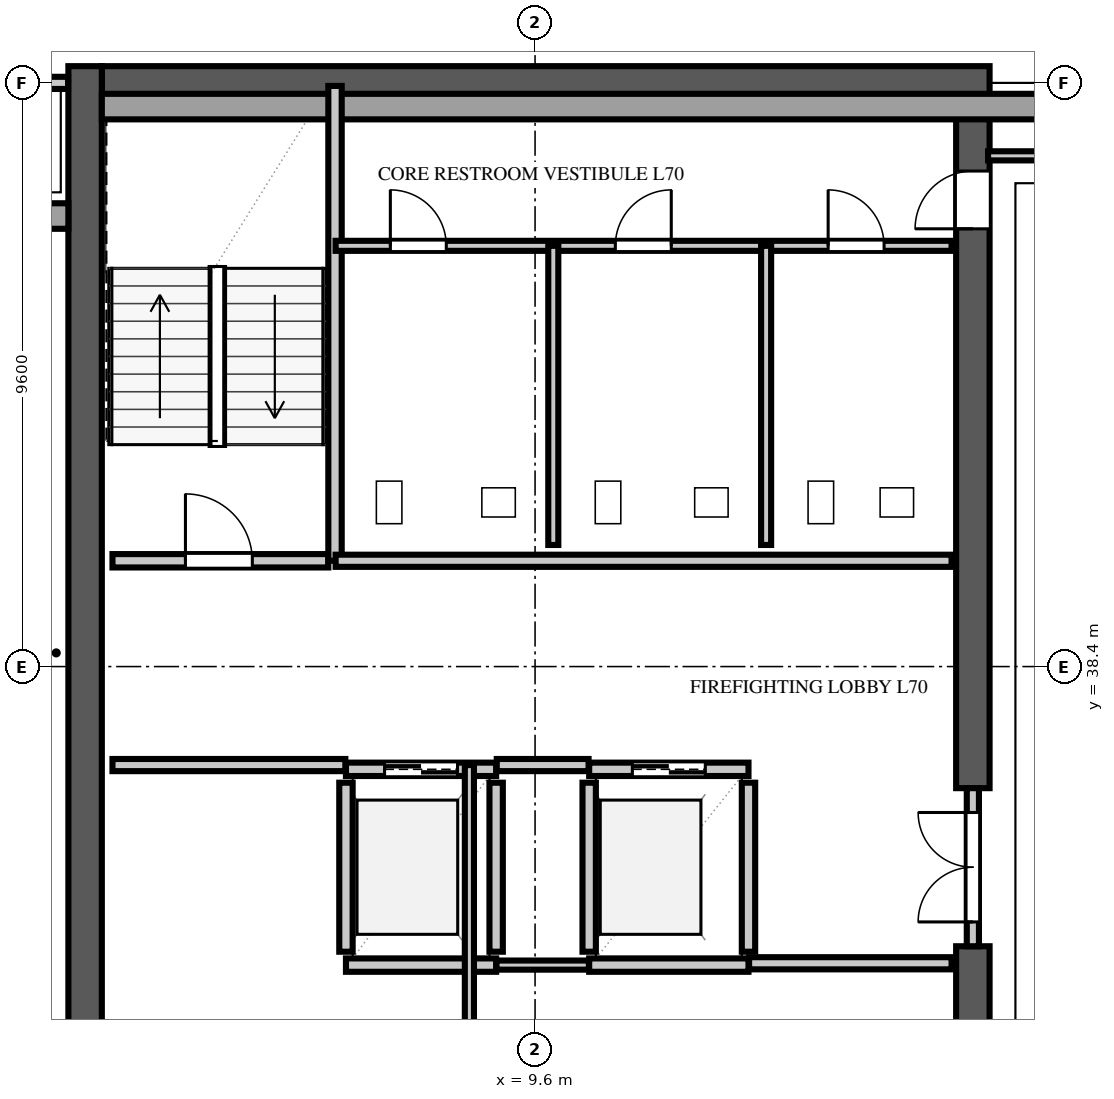
"""IFC4 building model, lengths in metres.
Left out: names, types, materials, properties, quantities, classifications, styles, units other than length and angle.
Written with IfcOpenShell. Run it as: python <this file> out.ifc"""

import sys

from ifc_helpers import new_model, si_unit, direction, frame, frame_2d, origin, place, context, subcontext, project, spatial, rectangle, extrude, element, fill, save


model = new_model("IFC4")
c1 = context("Model", 3, precision=1e-05, world=origin(), true_north=direction((0.0, 1.0)))
c2 = subcontext(c1, "Body", "Model", "MODEL_VIEW")
j1 = project(units=[si_unit("LENGTHUNIT", "METRE"), si_unit("PLANEANGLEUNIT", "RADIAN")], contexts=[c1])
p1 = place(None, origin())
s1 = spatial("IfcSite", under=j1, at=p1, CompositionType="ELEMENT")
p2 = place(p1, origin())
s2 = spatial("IfcBuilding", under=s1, at=p2, CompositionType="ELEMENT")
p3 = place(p2, frame((0.0, 0.0, 277.2)))
s3 = spatial("IfcBuildingStorey", under=s2, at=p3, CompositionType="ELEMENT", Elevation=277.2)
p4 = place(p3, frame((2.475, 48.0, 0.0), z_axis=(0.0, 0.0, 1.0), x_axis=(1.0, 0.0, 0.0)))
e1 = element("IfcWall", 1, at=p4, inside=s3, PredefinedType="SHEAR", context=c2, shape_type="SweptSolid", body=[
    extrude(rectangle(XDim=14.6, YDim=0.55, at=frame_2d((7.3, 0.0))), origin(), (0.0, 0.0, 1.0), 3.54),
])
p5 = place(p3, frame((2.2, 9.325, 0.0), z_axis=(0.0, 0.0, 1.0), x_axis=(0.0, 1.0, 0.0)))
e2 = element("IfcWall", 2, at=p5, inside=s3, PredefinedType="SHEAR", context=c2, shape_type="SweptSolid", body=[
    extrude(rectangle(XDim=38.95, YDim=0.55, at=frame_2d((19.475, 0.0))), origin(), (0.0, 0.0, 1.0), 3.54),
])
p6 = place(p3, frame((16.8, 26.0, 0.0), z_axis=(0.0, 0.0, 1.0), x_axis=(0.0, 1.0, 0.0)))
e3 = element("IfcWall", 3, at=p6, inside=s3, PredefinedType="SHEAR", context=c2, shape_type="SweptSolid", body=[
    extrude(rectangle(XDim=7.8, YDim=0.55, at=frame_2d((3.9, 0.0))), origin(), (0.0, 0.0, 1.0), 3.54),
])
p7 = place(p3, frame((16.8, 36.4, 0.0), z_axis=(0.0, 0.0, 1.0), x_axis=(0.0, 1.0, 0.0)))
e4 = element("IfcWall", 4, at=p7, inside=s3, PredefinedType="SHEAR", context=c2, shape_type="SweptSolid", body=[
    extrude(rectangle(XDim=11.325, YDim=0.55, at=frame_2d((5.663, 0.0))), origin(), (0.0, 0.0, 1.0), 3.54),
])
p8 = place(p7, frame((9.2, 0.0, 0.0)))
e5 = element("IfcOpeningElement", 5, at=p8, cuts=e4, PredefinedType="OPENING", context=c2, shape_type="SweptSolid", body=[
    extrude(rectangle(XDim=0.95, YDim=2.15, at=frame_2d((0.475, 1.075))), frame((0.0, 0.287, 0.0), z_axis=(0.0, -1.0, 0.0), x_axis=(1.0, 0.0, 0.0)), (0.0, 0.0, 1.0), 0.574),
])
p9 = place(p3, frame((36.56, 47.61, 0.0), z_axis=(0.0, 0.0, 1.0), x_axis=(-1.0, 0.0, 0.0)))
e6 = element("IfcWall", 6, at=p9, inside=s3, PredefinedType="SOLIDWALL", context=c2, shape_type="SweptSolid", body=[
    extrude(rectangle(XDim=34.085, YDim=0.42, at=frame_2d((17.042, 0.0))), origin(), (0.0, 0.0, 1.0), 3.54),
])
p10 = place(p9, frame((4.885, 0.0, 0.9)))
e7 = element("IfcOpeningElement", 7, at=p10, cuts=e6, PredefinedType="OPENING", context=c2, shape_type="SweptSolid", body=[
    extrude(rectangle(XDim=0.95, YDim=1.85, at=frame_2d((0.475, 0.925))), frame((0.0, 0.222, 0.0), z_axis=(0.0, -1.0, 0.0), x_axis=(1.0, 0.0, 0.0)), (0.0, 0.0, 1.0), 0.444),
])
p11 = place(p9, frame((9.41, 0.0, 0.9)))
e8 = element("IfcOpeningElement", 8, at=p11, cuts=e6, PredefinedType="OPENING", context=c2, shape_type="SweptSolid", body=[
    extrude(rectangle(XDim=1.5, YDim=1.85, at=frame_2d((0.75, 0.925))), frame((0.0, 0.222, 0.0), z_axis=(0.0, -1.0, 0.0), x_axis=(1.0, 0.0, 0.0)), (0.0, 0.0, 1.0), 0.444),
])
p12 = place(p9, frame((14.485, 0.0, 0.9)))
e9 = element("IfcOpeningElement", 9, at=p12, cuts=e6, PredefinedType="OPENING", context=c2, shape_type="SweptSolid", body=[
    extrude(rectangle(XDim=0.95, YDim=1.85, at=frame_2d((0.475, 0.925))), frame((0.0, 0.222, 0.0), z_axis=(0.0, -1.0, 0.0), x_axis=(1.0, 0.0, 0.0)), (0.0, 0.0, 1.0), 0.444),
])
p13 = place(p3, frame((1.925, 45.81, 0.0), z_axis=(0.0, 0.0, 1.0), x_axis=(-1.0, 0.0, 0.0)))
e10 = element("IfcWall", 10, at=p13, inside=s3, PredefinedType="SOLIDWALL", context=c2, shape_type="SweptSolid", body=[
    extrude(rectangle(XDim=1.885, YDim=0.42, at=frame_2d((0.942, 0.0))), origin(), (0.0, 0.0, 1.0), 3.54),
])
p14 = place(p3, frame((2.65, 40.14, 0.0), z_axis=(0.0, 0.0, 1.0), x_axis=(1.0, 0.0, 0.0)))
e11 = element("IfcWall", 11, at=p14, inside=s3, PredefinedType="SOLIDWALL", context=c2, shape_type="SweptSolid", body=[
    extrude(rectangle(XDim=3.55, YDim=0.22, at=frame_2d((1.775, 0.0))), origin(), (0.0, 0.0, 1.0), 3.54),
])
p15 = place(p14, frame((1.2, 0.0, 0.0)))
e12 = element("IfcOpeningElement", 12, at=p15, cuts=e11, PredefinedType="OPENING", context=c2, shape_type="SweptSolid", body=[
    extrude(rectangle(XDim=1.1, YDim=2.2, at=frame_2d((0.55, 1.1))), frame((0.0, 0.122, 0.0), z_axis=(0.0, -1.0, 0.0), x_axis=(1.0, 0.0, 0.0)), (0.0, 0.0, 1.0), 0.244),
])
p16 = place(p3, frame((6.31, 40.14, 0.0), z_axis=(0.0, 0.0, 1.0), x_axis=(0.0, 1.0, 0.0)))
e13 = element("IfcWall", 13, at=p16, inside=s3, PredefinedType="SOLIDWALL", context=c2, shape_type="SweptSolid", body=[
    extrude(rectangle(XDim=7.81, YDim=0.22, at=frame_2d((3.905, 0.0))), origin(), (0.0, 0.0, 1.0), 3.54),
])
for number, where, z_axis, x_axis in (
    (14, (6.49, 33.71, 0.0), (0.0, 0.0, 1.0), (0.0, 1.0, 0.0)),
    (15, (8.96, 33.71, 0.0), (0.0, 0.0, 1.0), (0.0, 1.0, 0.0)),
):
    element("IfcWall", number, at=place(p3, frame(where, z_axis=z_axis, x_axis=x_axis)), inside=s3, PredefinedType="SOLIDWALL", context=c2, shape_type="SweptSolid", body=[
        extrude(rectangle(XDim=2.78, YDim=0.22, at=frame_2d((1.39, 0.0))), origin(), (0.0, 0.0, 1.0), 3.54),
    ])
p17 = place(p3, frame((6.49, 33.49, 0.0), z_axis=(0.0, 0.0, 1.0), x_axis=(1.0, 0.0, 0.0)))
e16 = element("IfcWall", 16, at=p17, inside=s3, PredefinedType="SOLIDWALL", context=c2, shape_type="SweptSolid", body=[
    extrude(rectangle(XDim=2.47, YDim=0.22, at=frame_2d((1.235, 0.0))), origin(), (0.0, 0.0, 1.0), 3.54),
])
p18 = place(p3, frame((6.49, 36.71, 0.0), z_axis=(0.0, 0.0, 1.0), x_axis=(1.0, 0.0, 0.0)))
e17 = element("IfcWall", 17, at=p18, inside=s3, PredefinedType="SOLIDWALL", context=c2, shape_type="SweptSolid", body=[
    extrude(rectangle(XDim=2.47, YDim=0.22, at=frame_2d((1.235, 0.0))), origin(), (0.0, 0.0, 1.0), 3.54),
])
p19 = place(p18, frame((0.635, 0.0, 0.0)))
e18 = element("IfcOpeningElement", 18, at=p19, cuts=e17, PredefinedType="OPENING", context=c2, shape_type="SweptSolid", body=[
    extrude(rectangle(XDim=1.2, YDim=2.2, at=frame_2d((0.6, 1.1))), frame((0.0, 0.122, 0.0), z_axis=(0.0, -1.0, 0.0), x_axis=(1.0, 0.0, 0.0)), (0.0, 0.0, 1.0), 0.244),
])
for number, where, z_axis, x_axis in (
    (19, (10.49, 33.71, 0.0), (0.0, 0.0, 1.0), (0.0, 1.0, 0.0)),
    (20, (13.11, 33.71, 0.0), (0.0, 0.0, 1.0), (0.0, 1.0, 0.0)),
):
    element("IfcWall", number, at=place(p3, frame(where, z_axis=z_axis, x_axis=x_axis)), inside=s3, PredefinedType="SOLIDWALL", context=c2, shape_type="SweptSolid", body=[
        extrude(rectangle(XDim=2.78, YDim=0.22, at=frame_2d((1.39, 0.0))), origin(), (0.0, 0.0, 1.0), 3.54),
    ])
p20 = place(p3, frame((10.49, 33.49, 0.0), z_axis=(0.0, 0.0, 1.0), x_axis=(1.0, 0.0, 0.0)))
e21 = element("IfcWall", 21, at=p20, inside=s3, PredefinedType="SOLIDWALL", context=c2, shape_type="SweptSolid", body=[
    extrude(rectangle(XDim=2.62, YDim=0.22, at=frame_2d((1.31, 0.0))), origin(), (0.0, 0.0, 1.0), 3.54),
])
p21 = place(p3, frame((10.49, 36.71, 0.0), z_axis=(0.0, 0.0, 1.0), x_axis=(1.0, 0.0, 0.0)))
e22 = element("IfcWall", 22, at=p21, inside=s3, PredefinedType="SOLIDWALL", context=c2, shape_type="SweptSolid", body=[
    extrude(rectangle(XDim=2.62, YDim=0.22, at=frame_2d((1.31, 0.0))), origin(), (0.0, 0.0, 1.0), 3.54),
])
p22 = place(p21, frame((0.71, 0.0, 0.0)))
e23 = element("IfcOpeningElement", 23, at=p22, cuts=e22, PredefinedType="OPENING", context=c2, shape_type="SweptSolid", body=[
    extrude(rectangle(XDim=1.2, YDim=2.2, at=frame_2d((0.6, 1.1))), frame((0.0, 0.122, 0.0), z_axis=(0.0, -1.0, 0.0), x_axis=(1.0, 0.0, 0.0)), (0.0, 0.0, 1.0), 0.244),
])
p23 = place(p3, frame((2.65, 36.78, 0.0), z_axis=(0.0, 0.0, 1.0), x_axis=(1.0, 0.0, 0.0)))
e24 = element("IfcWall", 24, at=p23, inside=s3, PredefinedType="SOLIDWALL", context=c2, shape_type="SweptSolid", body=[
    extrude(rectangle(XDim=3.83, YDim=0.2, at=frame_2d((1.915, 0.0))), origin(), (0.0, 0.0, 1.0), 3.54),
])
p24 = place(p3, frame((8.97, 36.78, 0.0), z_axis=(0.0, 0.0, 1.0), x_axis=(1.0, 0.0, 0.0)))
e25 = element("IfcWall", 25, at=p24, inside=s3, PredefinedType="SOLIDWALL", context=c2, shape_type="SweptSolid", body=[
    extrude(rectangle(XDim=1.51, YDim=0.2, at=frame_2d((0.755, 0.0))), origin(), (0.0, 0.0, 1.0), 3.54),
])
p25 = place(p3, frame((13.12, 33.52, 0.0), z_axis=(0.0, 0.0, 1.0), x_axis=(1.0, 0.0, 0.0)))
e26 = element("IfcWall", 26, at=p25, inside=s3, PredefinedType="SOLIDWALL", context=c2, shape_type="SweptSolid", body=[
    extrude(rectangle(XDim=3.33, YDim=0.2, at=frame_2d((1.665, 0.0))), origin(), (0.0, 0.0, 1.0), 3.54),
])
p26 = place(p3, frame((6.32, 40.14, 0.0), z_axis=(0.0, 0.0, 1.0), x_axis=(1.0, 0.0, 0.0)))
e27 = element("IfcWall", 27, at=p26, inside=s3, PredefinedType="SOLIDWALL", context=c2, shape_type="SweptSolid", body=[
    extrude(rectangle(XDim=10.13, YDim=0.2, at=frame_2d((5.065, 0.0))), origin(), (0.0, 0.0, 1.0), 3.54),
])
p27 = place(p3, frame((16.8, 33.8, 0.0), z_axis=(0.0, 0.0, 1.0), x_axis=(0.0, 1.0, 0.0)))
e28 = element("IfcWall", 28, at=p27, inside=s3, PredefinedType="SOLIDWALL", context=c2, shape_type="SweptSolid", body=[
    extrude(rectangle(XDim=2.6, YDim=0.2, at=frame_2d((1.3, 0.0))), origin(), (0.0, 0.0, 1.0), 3.54),
])
p28 = place(p27, frame((0.4, 0.0, 0.0)))
e29 = element("IfcOpeningElement", 29, at=p28, cuts=e28, PredefinedType="OPENING", context=c2, shape_type="SweptSolid", body=[
    extrude(rectangle(XDim=1.8, YDim=2.2, at=frame_2d((0.9, 1.1))), frame((0.0, 0.112, 0.0), z_axis=(0.0, -1.0, 0.0), x_axis=(1.0, 0.0, 0.0)), (0.0, 0.0, 1.0), 0.224),
])
p29 = place(p3, frame((8.965, 33.49, 0.0), z_axis=(0.0, 0.0, 1.0), x_axis=(1.0, 0.0, 0.0)))
e30 = element("IfcWall", 30, at=p29, inside=s3, PredefinedType="PARTITIONING", context=c2, shape_type="SweptSolid", body=[
    extrude(rectangle(XDim=1.52, YDim=0.15, at=frame_2d((0.76, 0.0))), origin(), (0.0, 0.0, 1.0), 3.54),
])
p30 = place(p3, frame((8.52, 12.02, 0.0), z_axis=(0.0, 0.0, 1.0), x_axis=(0.0, 1.0, 0.0)))
e31 = element("IfcWall", 31, at=p30, inside=s3, PredefinedType="PARTITIONING", context=c2, shape_type="SweptSolid", body=[
    extrude(rectangle(XDim=24.76, YDim=0.15, at=frame_2d((12.38, 0.0))), origin(), (0.0, 0.0, 1.0), 3.54),
])
p31 = place(p30, frame((6.0, 0.0, 0.0)))
e32 = element("IfcOpeningElement", 32, at=p31, cuts=e31, PredefinedType="OPENING", context=c2, shape_type="SweptSolid", body=[
    extrude(rectangle(XDim=0.95, YDim=2.15, at=frame_2d((0.475, 1.075))), frame((0.0, 0.087, 0.0), z_axis=(0.0, -1.0, 0.0), x_axis=(1.0, 0.0, 0.0)), (0.0, 0.0, 1.0), 0.174),
])
p32 = place(p30, frame((14.0, 0.0, 0.0)))
e33 = element("IfcOpeningElement", 33, at=p32, cuts=e31, PredefinedType="OPENING", context=c2, shape_type="SweptSolid", body=[
    extrude(rectangle(XDim=0.95, YDim=2.15, at=frame_2d((0.475, 1.075))), frame((0.0, 0.087, 0.0), z_axis=(0.0, -1.0, 0.0), x_axis=(1.0, 0.0, 0.0)), (0.0, 0.0, 1.0), 0.174),
])
p33 = place(p3, frame((6.32, 45.32, 0.0), z_axis=(0.0, 0.0, 1.0), x_axis=(1.0, 0.0, 0.0)))
e34 = element("IfcWall", 34, at=p33, inside=s3, PredefinedType="PLUMBINGWALL", context=c2, shape_type="SweptSolid", body=[
    extrude(rectangle(XDim=10.13, YDim=0.165, at=frame_2d((5.065, 0.0))), origin(), (0.0, 0.0, 1.0), 3.54),
])
p34 = place(p33, frame((0.9, 0.0, 0.0)))
e35 = element("IfcOpeningElement", 35, at=p34, cuts=e34, PredefinedType="OPENING", context=c2, shape_type="SweptSolid", body=[
    extrude(rectangle(XDim=0.92, YDim=2.15, at=frame_2d((0.46, 1.075))), frame((0.0, 0.094, 0.0), z_axis=(0.0, -1.0, 0.0), x_axis=(1.0, 0.0, 0.0)), (0.0, 0.0, 1.0), 0.189),
])
p35 = place(p33, frame((4.6, 0.0, 0.0)))
e36 = element("IfcOpeningElement", 36, at=p35, cuts=e34, PredefinedType="OPENING", context=c2, shape_type="SweptSolid", body=[
    extrude(rectangle(XDim=0.92, YDim=2.15, at=frame_2d((0.46, 1.075))), frame((0.0, 0.094, 0.0), z_axis=(0.0, -1.0, 0.0), x_axis=(1.0, 0.0, 0.0)), (0.0, 0.0, 1.0), 0.189),
])
p36 = place(p33, frame((8.1, 0.0, 0.0)))
e37 = element("IfcOpeningElement", 37, at=p36, cuts=e34, PredefinedType="OPENING", context=c2, shape_type="SweptSolid", body=[
    extrude(rectangle(XDim=0.92, YDim=2.15, at=frame_2d((0.46, 1.075))), frame((0.0, 0.094, 0.0), z_axis=(0.0, -1.0, 0.0), x_axis=(1.0, 0.0, 0.0)), (0.0, 0.0, 1.0), 0.189),
])
for number, where, z_axis, x_axis in (
    (38, (9.9, 40.4, 0.0), (0.0, 0.0, 1.0), (0.0, 1.0, 0.0)),
    (39, (13.4, 40.4, 0.0), (0.0, 0.0, 1.0), (0.0, 1.0, 0.0)),
):
    element("IfcWall", number, at=place(p3, frame(where, z_axis=z_axis, x_axis=x_axis)), inside=s3, PredefinedType="PLUMBINGWALL", context=c2, shape_type="SweptSolid", body=[
        extrude(rectangle(XDim=4.92, YDim=0.165, at=frame_2d((2.46, 0.0))), origin(), (0.0, 0.0, 1.0), 3.54),
    ])
p37 = place(p3, frame((0.85, 48.0, 0.0), z_axis=(0.0, 0.0, 1.0), x_axis=(1.0, 0.0, 0.0)))
e40 = element("IfcWall", 40, at=p37, inside=s3, PredefinedType="SOLIDWALL", context=c2, shape_type="SweptSolid", body=[
    extrude(rectangle(XDim=1.07, YDim=0.2, at=frame_2d((0.535, 0.0))), origin(), (0.0, 0.0, 1.0), 3.54),
])
p38 = place(p3, frame((17.05, 46.8, 0.0), z_axis=(0.0, 0.0, 1.0), x_axis=(1.0, 0.0, 0.0)))
e41 = element("IfcWall", 41, at=p38, inside=s3, PredefinedType="PARTITIONING", context=c2, shape_type="SweptSolid", body=[
    extrude(rectangle(XDim=2.15, YDim=0.15, at=frame_2d((1.075, 0.0))), origin(), (0.0, 0.0, 1.0), 3.54),
])
p39 = place(p15, origin())
e42 = element("IfcDoor", 42, at=p39, inside=s3, OperationType="SINGLE_SWING_LEFT", PredefinedType="DOOR", context=c2, shape_type="SweptSolid", body=[
    extrude(rectangle(XDim=1.1, YDim=2.2, at=frame_2d((0.55, 1.1))), frame((0.0, 0.025, 0.0), z_axis=(0.0, -1.0, 0.0), x_axis=(1.0, 0.0, 0.0)), (0.0, 0.0, 1.0), 0.05),
])
fill(e12, e42)
p40 = place(p19, origin())
e43 = element("IfcDoor", 43, at=p40, inside=s3, OperationType="DOUBLE_DOOR_SLIDING", PredefinedType="DOOR", context=c2, shape_type="SweptSolid", body=[
    extrude(rectangle(XDim=1.2, YDim=2.2, at=frame_2d((0.6, 1.1))), frame((0.0, 0.025, 0.0), z_axis=(0.0, -1.0, 0.0), x_axis=(1.0, 0.0, 0.0)), (0.0, 0.0, 1.0), 0.05),
])
fill(e18, e43)
p41 = place(p22, origin())
e44 = element("IfcDoor", 44, at=p41, inside=s3, OperationType="DOUBLE_DOOR_SLIDING", PredefinedType="DOOR", context=c2, shape_type="SweptSolid", body=[
    extrude(rectangle(XDim=1.2, YDim=2.2, at=frame_2d((0.6, 1.1))), frame((0.0, 0.025, 0.0), z_axis=(0.0, -1.0, 0.0), x_axis=(1.0, 0.0, 0.0)), (0.0, 0.0, 1.0), 0.05),
])
fill(e23, e44)
p42 = place(p8, origin())
e45 = element("IfcDoor", 45, at=p42, inside=s3, OperationType="SINGLE_SWING_LEFT", PredefinedType="DOOR", context=c2, shape_type="SweptSolid", body=[
    extrude(rectangle(XDim=0.95, YDim=2.15, at=frame_2d((0.475, 1.075))), frame((0.0, 0.025, 0.0), z_axis=(0.0, -1.0, 0.0), x_axis=(1.0, 0.0, 0.0)), (0.0, 0.0, 1.0), 0.05),
])
fill(e5, e45)
p43 = place(p28, origin())
e46 = element("IfcDoor", 46, at=p43, inside=s3, OperationType="DOUBLE_DOOR_SINGLE_SWING", PredefinedType="DOOR", context=c2, shape_type="SweptSolid", body=[
    extrude(rectangle(XDim=1.8, YDim=2.2, at=frame_2d((0.9, 1.1))), frame((0.0, 0.025, 0.0), z_axis=(0.0, -1.0, 0.0), x_axis=(1.0, 0.0, 0.0)), (0.0, 0.0, 1.0), 0.05),
])
fill(e29, e46)
p44 = place(p34, origin())
e47 = element("IfcDoor", 47, at=p44, inside=s3, OperationType="SINGLE_SWING_LEFT", PredefinedType="DOOR", context=c2, shape_type="SweptSolid", body=[
    extrude(rectangle(XDim=0.92, YDim=2.15, at=frame_2d((0.46, 1.075))), frame((0.0, 0.025, 0.0), z_axis=(0.0, -1.0, 0.0), x_axis=(1.0, 0.0, 0.0)), (0.0, 0.0, 1.0), 0.05),
])
fill(e35, e47)
p45 = place(p35, origin())
e48 = element("IfcDoor", 48, at=p45, inside=s3, OperationType="SINGLE_SWING_RIGHT", PredefinedType="DOOR", context=c2, shape_type="SweptSolid", body=[
    extrude(rectangle(XDim=0.92, YDim=2.15, at=frame_2d((0.46, 1.075))), frame((0.0, 0.025, 0.0), z_axis=(0.0, -1.0, 0.0), x_axis=(1.0, 0.0, 0.0)), (0.0, 0.0, 1.0), 0.05),
])
fill(e36, e48)
p46 = place(p36, origin())
e49 = element("IfcDoor", 49, at=p46, inside=s3, OperationType="SINGLE_SWING_LEFT", PredefinedType="DOOR", context=c2, shape_type="SweptSolid", body=[
    extrude(rectangle(XDim=0.92, YDim=2.15, at=frame_2d((0.46, 1.075))), frame((0.0, 0.025, 0.0), z_axis=(0.0, -1.0, 0.0), x_axis=(1.0, 0.0, 0.0)), (0.0, 0.0, 1.0), 0.05),
])
fill(e37, e49)
save(model, sys.argv[1])
